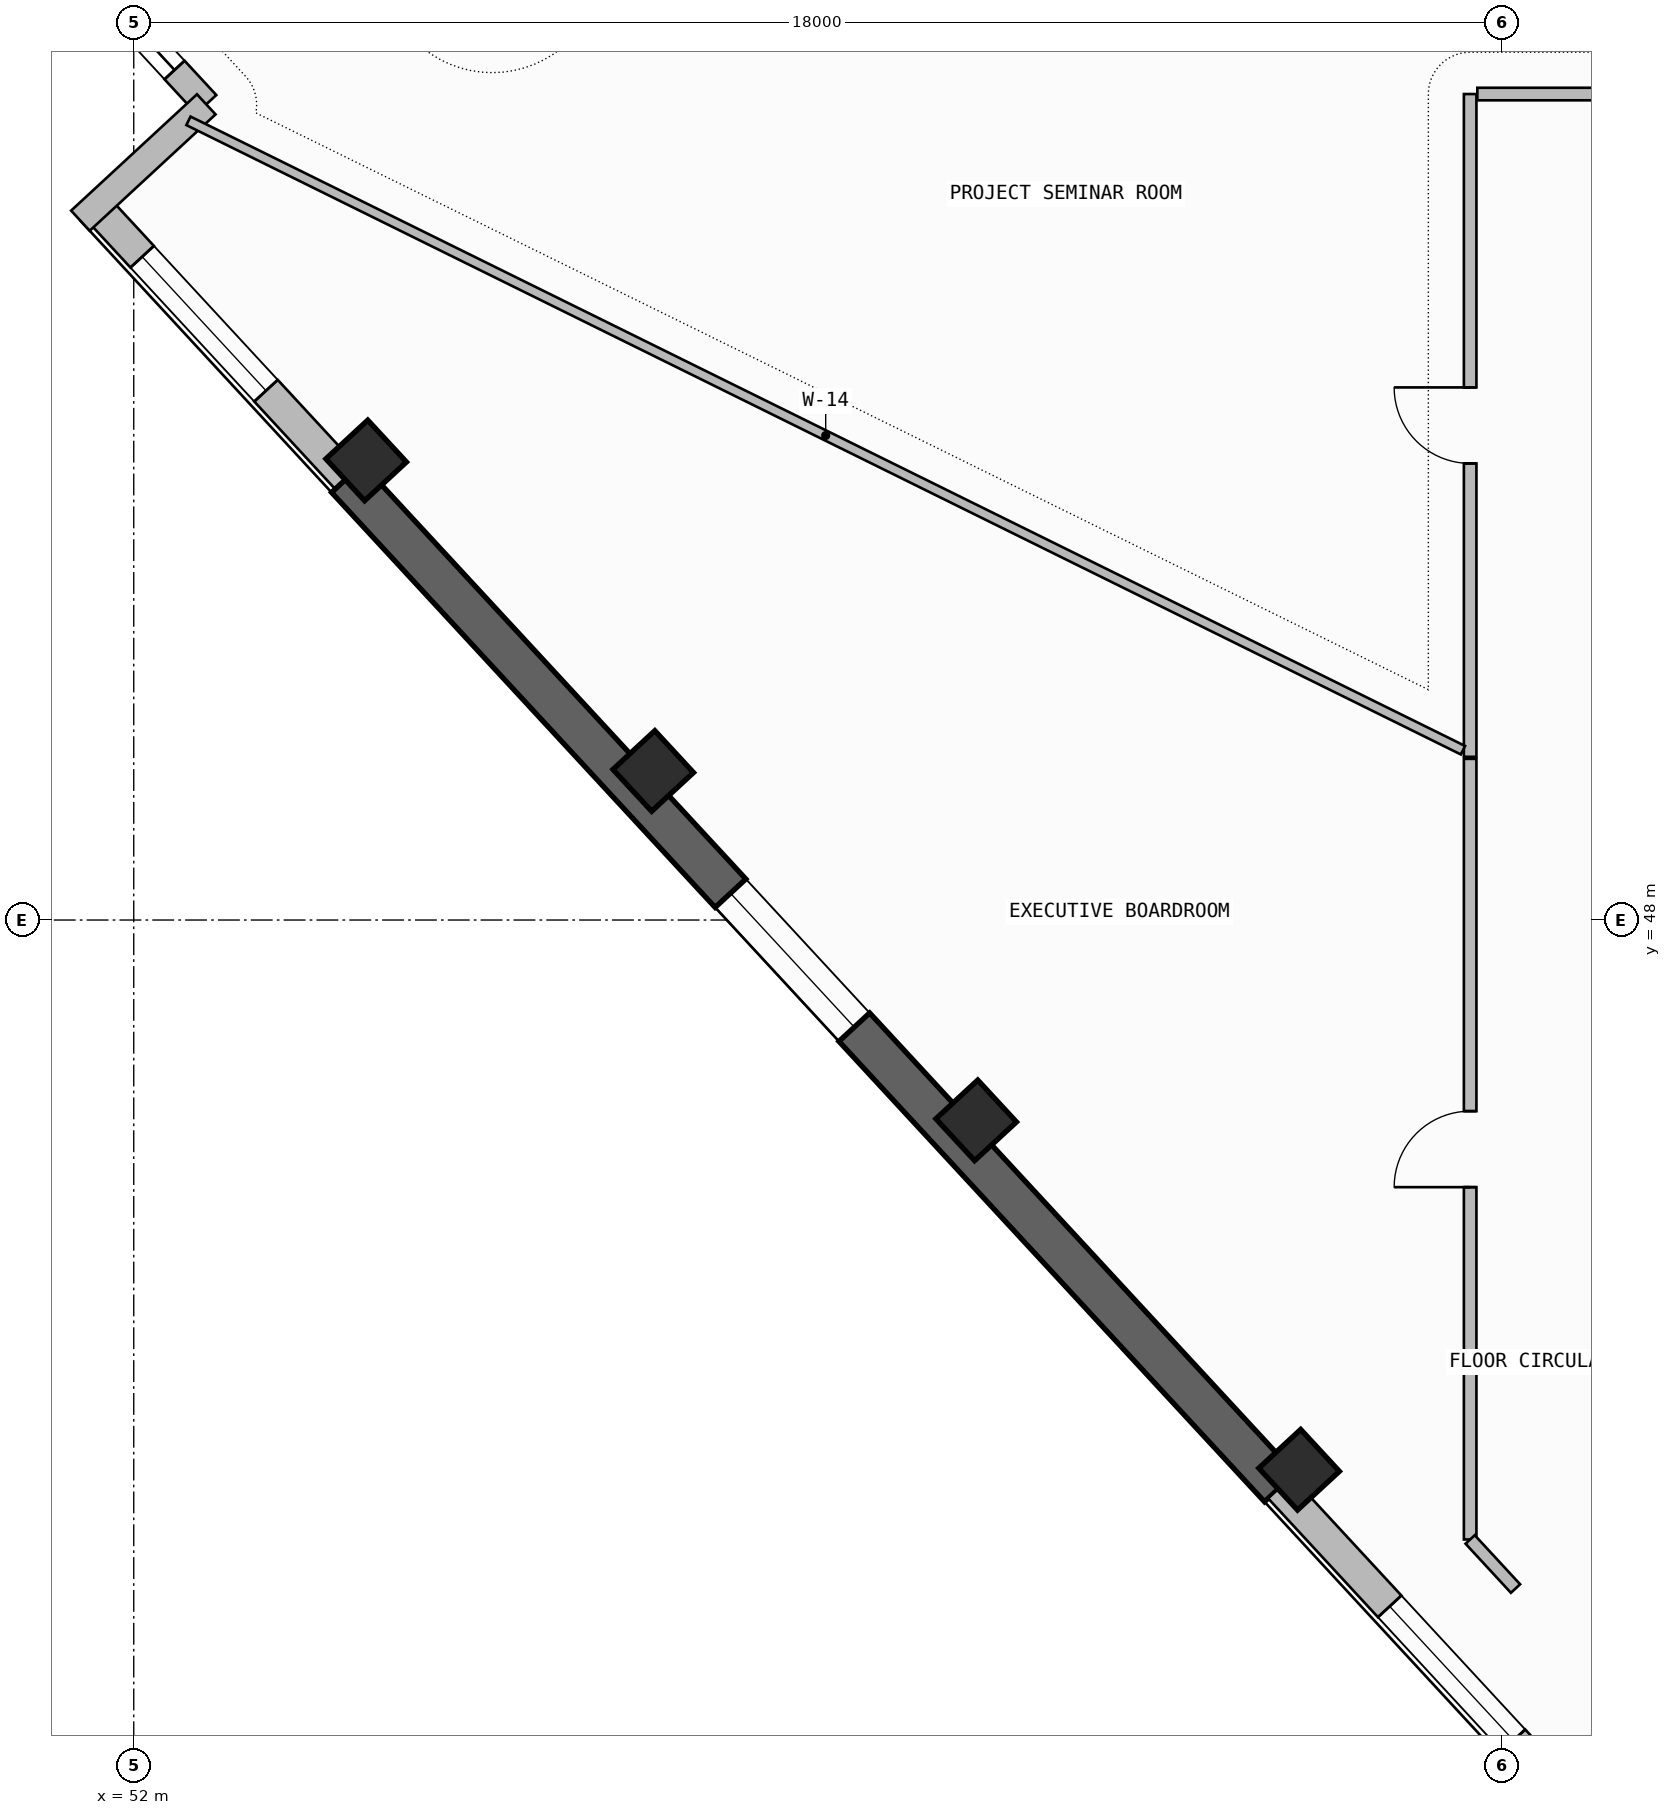
"""IFC4 building model, lengths in metres.
Left out: names, types, materials, properties, quantities, classifications, styles, units other than length and angle.
Written with IfcOpenShell. Run it as: python <this file> out.ifc"""

import sys

from ifc_helpers import new_model, si_unit, direction, frame, frame_2d, origin, origin_2d, place, context, subcontext, project, spatial, rectangle, extrude, element, fill, save


model = new_model("IFC4")
c1 = context("Model", 3, precision=1e-05, world=origin(), true_north=direction((0.0, 1.0)))
c2 = subcontext(c1, "Body", "Model", "MODEL_VIEW")
j1 = project(units=[si_unit("LENGTHUNIT", "METRE"), si_unit("PLANEANGLEUNIT", "RADIAN")], contexts=[c1])
p1 = place(None, origin())
s1 = spatial("IfcSite", under=j1, at=p1, CompositionType="ELEMENT")
p2 = place(p1, origin())
s2 = spatial("IfcBuilding", under=s1, at=p2, CompositionType="ELEMENT")
p3 = place(p2, frame((0.0, 0.0, 267.78)))
s3 = spatial("IfcBuildingStorey", under=s2, at=p3, CompositionType="ELEMENT", Elevation=267.78)
for number, where, z_axis, x_axis in (
    (1, (55.058, 54.046, 0.0), (0.0, 0.0, 1.0), (-0.679, 0.734, 0.0)),
    (2, (58.835, 49.961, 0.0), (0.0, 0.0, 1.0), (-0.679, 0.734, 0.0)),
    (3, (63.084, 45.364, 0.0), (0.0, 0.0, 1.0), (-0.679, 0.734, 0.0)),
    (4, (67.333, 40.768, 0.0), (0.0, 0.0, 1.0), (-0.679, 0.734, 0.0)),
):
    element("IfcColumn", number, at=place(p3, frame(where, z_axis=z_axis, x_axis=x_axis)), inside=s3, PredefinedType="COLUMN", context=c2, shape_type="SweptSolid", body=[
        extrude(rectangle(XDim=0.75, YDim=0.75, at=origin_2d()), origin(), (0.0, 0.0, 1.0), 3.52),
    ])
p4 = place(p3, frame((51.5, 57.387, 0.0), z_axis=(0.0, 0.0, 1.0), x_axis=(0.67880684669, -0.734316869537, 0.0)))
e5 = element("IfcWall", 5, at=p4, inside=s3, PredefinedType="SOLIDWALL", context=c2, shape_type="SweptSolid", body=[
    extrude(rectangle(XDim=4.869, YDim=0.42, at=frame_2d((2.434, 0.0))), origin(), (0.0, 0.0, 1.0), 2.645),
])
p5 = place(p4, frame((0.9, 0.0, 1.1)))
e6 = element("IfcOpeningElement", 6, at=p5, cuts=e5, PredefinedType="OPENING", context=c2, shape_type="SweptSolid", body=[
    extrude(rectangle(XDim=2.4, YDim=1.2, at=frame_2d((1.2, 0.6))), frame((0.0, 0.22, 0.0), z_axis=(0.0, -1.0, 0.0), x_axis=(1.0, 0.0, 0.0)), (0.0, 0.0, 1.0), 0.44),
])
p6 = place(p3, frame((54.805, 53.812, -0.26), z_axis=(0.0, 0.0, 1.0), x_axis=(0.678803115619, -0.734320318543, 0.0)))
e7 = element("IfcWall", 7, at=p6, inside=s3, PredefinedType="SHEAR", context=c2, shape_type="SweptSolid", body=[
    extrude(rectangle(XDim=18.083, YDim=0.55, at=frame_2d((9.042, 0.0))), origin(), (0.0, 0.0, 1.0), 3.52),
])
p7 = place(p6, frame((7.434, 0.0, 1.1)))
e8 = element("IfcOpeningElement", 8, at=p7, cuts=e7, PredefinedType="OPENING", context=c2, shape_type="SweptSolid", body=[
    extrude(rectangle(XDim=2.4, YDim=1.2, at=frame_2d((1.2, 0.6))), frame((0.0, 0.285, 0.0), z_axis=(0.0, -1.0, 0.0), x_axis=(1.0, 0.0, 0.0)), (0.0, 0.0, 1.0), 0.57),
])
p8 = place(p3, frame((67.08, 40.533, 0.0), z_axis=(0.0, 0.0, 1.0), x_axis=(0.678800006437, -0.734323192648, 0.0)))
e9 = element("IfcWall", 9, at=p8, inside=s3, PredefinedType="SOLIDWALL", context=c2, shape_type="SweptSolid", body=[
    extrude(rectangle(XDim=6.512, YDim=0.42, at=frame_2d((3.256, 0.0))), origin(), (0.0, 0.0, 1.0), 2.645),
])
p9 = place(p8, frame((2.129, 0.0, 1.1)))
e10 = element("IfcOpeningElement", 10, at=p9, cuts=e9, PredefinedType="OPENING", context=c2, shape_type="SweptSolid", body=[
    extrude(rectangle(XDim=2.4, YDim=1.2, at=frame_2d((1.2, 0.6))), frame((0.0, 0.22, 0.0), z_axis=(0.0, -1.0, 0.0), x_axis=(1.0, 0.0, 0.0)), (0.0, 0.0, 1.0), 0.44),
])
p10 = place(p3, frame((51.423, 60.387, 0.0), z_axis=(0.0, 0.0, 1.0), x_axis=(0.678792531533, -0.734330102294, 0.0)))
e11 = element("IfcWall", 11, at=p10, inside=s3, PredefinedType="SOLIDWALL", context=c2, shape_type="SweptSolid", body=[
    extrude(rectangle(XDim=2.255, YDim=0.36, at=frame_2d((1.127, 0.0))), origin(), (0.0, 0.0, 1.0), 3.26),
])
p11 = place(p10, frame((0.34, 0.0, 0.45)))
e12 = element("IfcOpeningElement", 12, at=p11, cuts=e11, PredefinedType="OPENING", context=c2, shape_type="SweptSolid", body=[
    extrude(rectangle(XDim=1.3, YDim=2.4, at=frame_2d((0.65, 1.2))), frame((0.0, 0.19, 0.0), z_axis=(0.0, -1.0, 0.0), x_axis=(1.0, 0.0, 0.0)), (0.0, 0.0, 1.0), 0.38),
])
p12 = place(p3, frame((52.954, 58.731, 0.0), z_axis=(0.0, 0.0, 1.0), x_axis=(-0.734330102294, -0.678792531533, 0.0)))
e13 = element("IfcWall", 13, at=p12, inside=s3, PredefinedType="SOLIDWALL", context=c2, shape_type="SweptSolid", body=[
    extrude(rectangle(XDim=2.255, YDim=0.36, at=frame_2d((1.127, 0.0))), origin(), (0.0, 0.0, 1.0), 3.26),
])
p13 = place(p3, frame((69.583, 58.867, 0.0), z_axis=(0.0, 0.0, 1.0), x_axis=(0.0, -1.0, 0.0)))
e14 = element("IfcWall", 14, at=p13, inside=s3, PredefinedType="PARTITIONING", context=c2, shape_type="SweptSolid", body=[
    extrude(rectangle(XDim=8.719, YDim=0.165, at=frame_2d((4.36, 0.0))), origin(), (0.0, 0.0, 1.0), 2.745),
])
p14 = place(p13, frame((3.86, 0.0, 0.0)))
e15 = element("IfcOpeningElement", 15, at=p14, cuts=e14, PredefinedType="OPENING", context=c2, shape_type="SweptSolid", body=[
    extrude(rectangle(XDim=1.0, YDim=2.2, at=frame_2d((0.5, 1.1))), frame((0.0, 0.093, 0.0), z_axis=(0.0, -1.0, 0.0), x_axis=(1.0, 0.0, 0.0)), (0.0, 0.0, 1.0), 0.185),
])
p15 = place(p3, frame((73.964, 58.867, 0.0), z_axis=(0.0, 0.0, 1.0), x_axis=(-1.0, 0.0, 0.0)))
e16 = element("IfcWall", 16, at=p15, inside=s3, PredefinedType="PARTITIONING", context=c2, shape_type="SweptSolid", body=[
    extrude(rectangle(XDim=4.286, YDim=0.165, at=frame_2d((2.143, 0.0))), origin(), (0.0, 0.0, 1.0), 3.26),
])
p16 = place(p3, frame((69.489, 50.234, 0.0), z_axis=(0.0, 0.0, 1.0), x_axis=(-0.896640561753, 0.442759193038, 0.0)))
e17 = element("IfcWall", 17, at=p16, inside=s3, PredefinedType="PARTITIONING", context=c2, shape_type="SweptSolid", body=[
    extrude(rectangle(XDim=18.702, YDim=0.125, at=frame_2d((9.351, 0.0))), origin(), (0.0, 0.0, 1.0), 2.645),
])
p17 = place(p3, frame((69.583, 50.12, 0.0), z_axis=(0.0, 0.0, 1.0), x_axis=(0.0, -1.0, 0.0)))
e18 = element("IfcWall", 18, at=p17, inside=s3, PredefinedType="PARTITIONING", context=c2, shape_type="SweptSolid", body=[
    extrude(rectangle(XDim=10.27, YDim=0.165, at=frame_2d((5.135, 0.0))), origin(), (0.0, 0.0, 1.0), 3.26),
])
p18 = place(p17, frame((4.635, 0.0, 0.0)))
e19 = element("IfcOpeningElement", 19, at=p18, cuts=e18, PredefinedType="OPENING", context=c2, shape_type="SweptSolid", body=[
    extrude(rectangle(XDim=1.0, YDim=2.2, at=frame_2d((0.5, 1.1))), frame((0.0, 0.093, 0.0), z_axis=(0.0, -1.0, 0.0), x_axis=(1.0, 0.0, 0.0)), (0.0, 0.0, 1.0), 0.185),
])
p19 = place(p3, frame((69.583, 39.851, 0.0), z_axis=(0.0, 0.0, 1.0), x_axis=(0.678798821758, -0.73432428775, 0.0)))
e20 = element("IfcWall", 20, at=p19, inside=s3, PredefinedType="PARTITIONING", context=c2, shape_type="SweptSolid", body=[
    extrude(rectangle(XDim=0.879, YDim=0.165, at=frame_2d((0.44, 0.0))), origin(), (0.0, 0.0, 1.0), 3.26),
])
p20 = place(p5, origin())
e21 = element("IfcWindow", 21, at=p20, inside=s3, PartitioningType="SINGLE_PANEL", PredefinedType="WINDOW", context=c2, shape_type="SweptSolid", body=[
    extrude(rectangle(XDim=2.4, YDim=1.2, at=frame_2d((1.2, 0.6))), frame((0.0, 0.03, 0.0), z_axis=(0.0, -1.0, 0.0), x_axis=(1.0, 0.0, 0.0)), (0.0, 0.0, 1.0), 0.06),
])
fill(e6, e21)
p21 = place(p7, origin())
e22 = element("IfcWindow", 22, at=p21, inside=s3, PartitioningType="SINGLE_PANEL", PredefinedType="WINDOW", context=c2, shape_type="SweptSolid", body=[
    extrude(rectangle(XDim=2.4, YDim=1.2, at=frame_2d((1.2, 0.6))), frame((0.0, 0.03, 0.0), z_axis=(0.0, -1.0, 0.0), x_axis=(1.0, 0.0, 0.0)), (0.0, 0.0, 1.0), 0.06),
])
fill(e8, e22)
p22 = place(p9, origin())
e23 = element("IfcWindow", 23, at=p22, inside=s3, PartitioningType="SINGLE_PANEL", PredefinedType="WINDOW", context=c2, shape_type="SweptSolid", body=[
    extrude(rectangle(XDim=2.4, YDim=1.2, at=frame_2d((1.2, 0.6))), frame((0.0, 0.03, 0.0), z_axis=(0.0, -1.0, 0.0), x_axis=(1.0, 0.0, 0.0)), (0.0, 0.0, 1.0), 0.06),
])
fill(e10, e23)
p23 = place(p11, origin())
e24 = element("IfcWindow", 24, at=p23, inside=s3, PartitioningType="SINGLE_PANEL", PredefinedType="WINDOW", context=c2, shape_type="SweptSolid", body=[
    extrude(rectangle(XDim=1.3, YDim=2.4, at=frame_2d((0.65, 1.2))), frame((0.0, 0.03, 0.0), z_axis=(0.0, -1.0, 0.0), x_axis=(1.0, 0.0, 0.0)), (0.0, 0.0, 1.0), 0.06),
])
fill(e12, e24)
p24 = place(p14, frame((1.0, 0.0, 0.0), z_axis=(0.0, 0.0, 1.0), x_axis=(-1.0, 0.0, 0.0)))
e25 = element("IfcDoor", 25, at=p24, inside=s3, OperationType="SINGLE_SWING_RIGHT", PredefinedType="DOOR", context=c2, shape_type="SweptSolid", body=[
    extrude(rectangle(XDim=1.0, YDim=2.2, at=frame_2d((0.5, 1.1))), frame((0.0, 0.025, 0.0), z_axis=(0.0, -1.0, 0.0), x_axis=(1.0, 0.0, 0.0)), (0.0, 0.0, 1.0), 0.05),
])
fill(e15, e25)
p25 = place(p18, frame((1.0, 0.0, 0.0), z_axis=(0.0, 0.0, 1.0), x_axis=(-1.0, 0.0, 0.0)))
e26 = element("IfcDoor", 26, at=p25, inside=s3, OperationType="SINGLE_SWING_LEFT", PredefinedType="DOOR", context=c2, shape_type="SweptSolid", body=[
    extrude(rectangle(XDim=1.0, YDim=2.2, at=frame_2d((0.5, 1.1))), frame((0.0, 0.025, 0.0), z_axis=(0.0, -1.0, 0.0), x_axis=(1.0, 0.0, 0.0)), (0.0, 0.0, 1.0), 0.05),
])
fill(e19, e26)
save(model, sys.argv[1])
